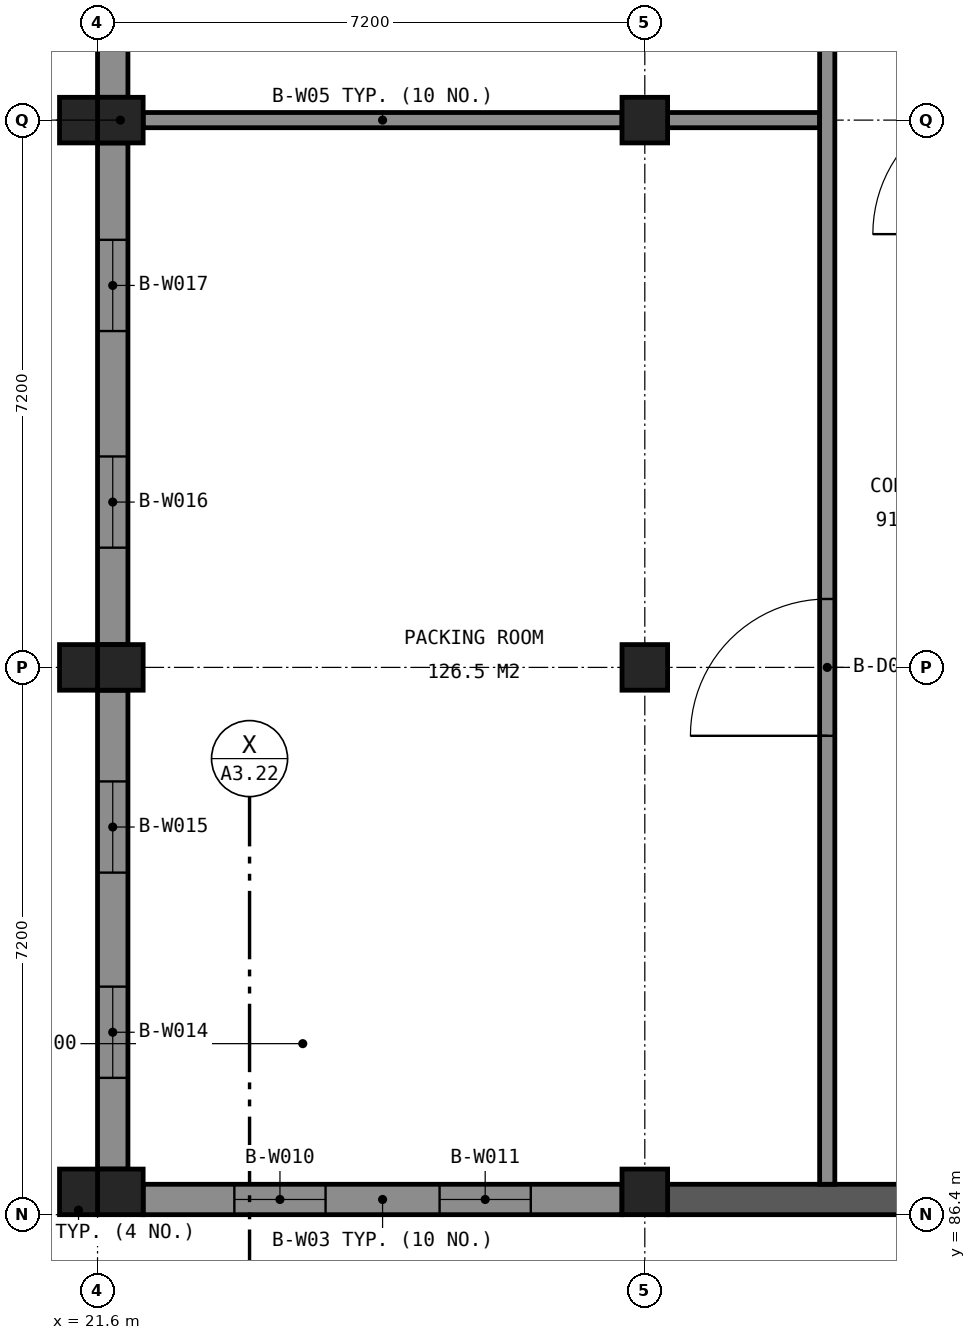
"""IFC4 building model, lengths in metres.
Left out: names, types, materials, properties, quantities, classifications, styles, units other than length and angle.
Written with IfcOpenShell. Run it as: python <this file> out.ifc"""

import sys

from ifc_helpers import new_model, si_unit, direction, frame, frame_2d, origin, origin_2d, place, context, subcontext, project, spatial, rectangle, extrude, element, fill, save


model = new_model("IFC4")
c1 = context("Model", 3, precision=1e-05, world=origin(), true_north=direction((0.0, 1.0)))
c2 = subcontext(c1, "Body", "Model", "MODEL_VIEW")
j1 = project(units=[si_unit("LENGTHUNIT", "METRE"), si_unit("PLANEANGLEUNIT", "RADIAN")], contexts=[c1])
p1 = place(None, origin())
s1 = spatial("IfcSite", under=j1, at=p1, CompositionType="ELEMENT")
p2 = place(p1, origin())
s2 = spatial("IfcBuilding", under=s1, at=p2, CompositionType="ELEMENT")
p3 = place(p2, frame((0.0, 0.0, 4.8)))
s3 = spatial("IfcBuildingStorey", under=s2, at=p3, CompositionType="ELEMENT", Elevation=4.8)
for number, where, z_axis, x_axis in (
    (1, (21.9, 100.8, 0.0), (0.0, 0.0, 1.0), (1.0, 0.0, 0.0)),
    (2, (21.9, 93.6, 0.0), (0.0, 0.0, 1.0), (1.0, 0.0, 0.0)),
    (3, (21.9, 86.7, 0.0), (0.0, 0.0, 1.0), (1.0, 0.0, 0.0)),
    (4, (28.8, 100.8, 0.0), (0.0, 0.0, 1.0), (1.0, 0.0, 0.0)),
    (5, (28.8, 93.6, 0.0), (0.0, 0.0, 1.0), (1.0, 0.0, 0.0)),
    (6, (28.8, 86.7, 0.0), (0.0, 0.0, 1.0), (1.0, 0.0, 0.0)),
):
    element("IfcColumn", number, at=place(p3, frame(where, z_axis=z_axis, x_axis=x_axis)), inside=s3, PredefinedType="COLUMN", context=c2, shape_type="SweptSolid", body=[
        extrude(rectangle(XDim=0.6, YDim=0.6, at=origin_2d()), origin(), (0.0, 0.0, 1.0), 4.8),
    ])
p4 = place(p3, frame((29.1, 86.6, 0.0), z_axis=(0.0, 0.0, 1.0), x_axis=(1.0, 0.0, 0.0)))
e7 = element("IfcWall", 7, at=p4, inside=s3, PredefinedType="SHEAR", context=c2, shape_type="SweptSolid", body=[
    extrude(rectangle(XDim=13.7, YDim=0.4, at=frame_2d((6.85, 0.0))), origin(), (0.0, 0.0, 1.0), 4.55),
])
p5 = place(p3, frame((22.2, 86.6, 0.0), z_axis=(0.0, 0.0, 1.0), x_axis=(1.0, 0.0, 0.0)))
e8 = element("IfcWall", 8, at=p5, inside=s3, PredefinedType="SOLIDWALL", context=c2, shape_type="SweptSolid", body=[
    extrude(rectangle(XDim=6.3, YDim=0.4, at=frame_2d((3.15, 0.0))), origin(), (0.0, 0.0, 1.0), 3.95),
])
p6 = place(p5, frame((1.2, 0.0, 0.9)))
e9 = element("IfcOpeningElement", 9, at=p6, cuts=e8, PredefinedType="OPENING", context=c2, shape_type="SweptSolid", body=[
    extrude(rectangle(XDim=1.2, YDim=2.4, at=frame_2d((0.6, 1.2))), frame((0.0, 0.21, 0.0), z_axis=(0.0, -1.0, 0.0), x_axis=(1.0, 0.0, 0.0)), (0.0, 0.0, 1.0), 0.42),
])
p7 = place(p5, frame((3.9, 0.0, 0.9)))
e10 = element("IfcOpeningElement", 10, at=p7, cuts=e8, PredefinedType="OPENING", context=c2, shape_type="SweptSolid", body=[
    extrude(rectangle(XDim=1.2, YDim=2.4, at=frame_2d((0.6, 1.2))), frame((0.0, 0.21, 0.0), z_axis=(0.0, -1.0, 0.0), x_axis=(1.0, 0.0, 0.0)), (0.0, 0.0, 1.0), 0.42),
])
p8 = place(p3, frame((21.8, 87.0, 0.0), z_axis=(0.0, 0.0, 1.0), x_axis=(0.0, 1.0, 0.0)))
e11 = element("IfcWall", 11, at=p8, inside=s3, PredefinedType="SOLIDWALL", context=c2, shape_type="SweptSolid", body=[
    extrude(rectangle(XDim=6.3, YDim=0.4, at=frame_2d((3.15, 0.0))), origin(), (0.0, 0.0, 1.0), 3.95),
])
p9 = place(p8, frame((1.2, 0.0, 0.9)))
e12 = element("IfcOpeningElement", 12, at=p9, cuts=e11, PredefinedType="OPENING", context=c2, shape_type="SweptSolid", body=[
    extrude(rectangle(XDim=1.2, YDim=2.4, at=frame_2d((0.6, 1.2))), frame((0.0, 0.21, 0.0), z_axis=(0.0, -1.0, 0.0), x_axis=(1.0, 0.0, 0.0)), (0.0, 0.0, 1.0), 0.42),
])
p10 = place(p8, frame((3.9, 0.0, 0.9)))
e13 = element("IfcOpeningElement", 13, at=p10, cuts=e11, PredefinedType="OPENING", context=c2, shape_type="SweptSolid", body=[
    extrude(rectangle(XDim=1.2, YDim=2.4, at=frame_2d((0.6, 1.2))), frame((0.0, 0.21, 0.0), z_axis=(0.0, -1.0, 0.0), x_axis=(1.0, 0.0, 0.0)), (0.0, 0.0, 1.0), 0.42),
])
p11 = place(p3, frame((21.8, 93.9, 0.0), z_axis=(0.0, 0.0, 1.0), x_axis=(0.0, 1.0, 0.0)))
e14 = element("IfcWall", 14, at=p11, inside=s3, PredefinedType="SOLIDWALL", context=c2, shape_type="SweptSolid", body=[
    extrude(rectangle(XDim=6.6, YDim=0.4, at=frame_2d((3.3, 0.0))), origin(), (0.0, 0.0, 1.0), 3.95),
])
p12 = place(p11, frame((1.275, 0.0, 0.9)))
e15 = element("IfcOpeningElement", 15, at=p12, cuts=e14, PredefinedType="OPENING", context=c2, shape_type="SweptSolid", body=[
    extrude(rectangle(XDim=1.2, YDim=2.4, at=frame_2d((0.6, 1.2))), frame((0.0, 0.21, 0.0), z_axis=(0.0, -1.0, 0.0), x_axis=(1.0, 0.0, 0.0)), (0.0, 0.0, 1.0), 0.42),
])
p13 = place(p11, frame((4.125, 0.0, 0.9)))
e16 = element("IfcOpeningElement", 16, at=p13, cuts=e14, PredefinedType="OPENING", context=c2, shape_type="SweptSolid", body=[
    extrude(rectangle(XDim=1.2, YDim=2.4, at=frame_2d((0.6, 1.2))), frame((0.0, 0.21, 0.0), z_axis=(0.0, -1.0, 0.0), x_axis=(1.0, 0.0, 0.0)), (0.0, 0.0, 1.0), 0.42),
])
p14 = place(p3, frame((21.8, 101.1, 0.0), z_axis=(0.0, 0.0, 1.0), x_axis=(0.0, 1.0, 0.0)))
e17 = element("IfcWall", 17, at=p14, inside=s3, PredefinedType="SOLIDWALL", context=c2, shape_type="SweptSolid", body=[
    extrude(rectangle(XDim=6.6, YDim=0.4, at=frame_2d((3.3, 0.0))), origin(), (0.0, 0.0, 1.0), 3.95),
])
p15 = place(p14, frame((1.275, 0.0, 0.9)))
e18 = element("IfcOpeningElement", 18, at=p15, cuts=e17, PredefinedType="OPENING", context=c2, shape_type="SweptSolid", body=[
    extrude(rectangle(XDim=1.2, YDim=2.4, at=frame_2d((0.6, 1.2))), frame((0.0, 0.21, 0.0), z_axis=(0.0, -1.0, 0.0), x_axis=(1.0, 0.0, 0.0)), (0.0, 0.0, 1.0), 0.42),
])
p16 = place(p14, frame((4.125, 0.0, 0.9)))
e19 = element("IfcOpeningElement", 19, at=p16, cuts=e17, PredefinedType="OPENING", context=c2, shape_type="SweptSolid", body=[
    extrude(rectangle(XDim=1.2, YDim=2.4, at=frame_2d((0.6, 1.2))), frame((0.0, 0.21, 0.0), z_axis=(0.0, -1.0, 0.0), x_axis=(1.0, 0.0, 0.0)), (0.0, 0.0, 1.0), 0.42),
])
for number, where, z_axis, x_axis in (
    (20, (21.35, 86.7, 0.0), (0.0, 0.0, 1.0), (1.0, 0.0, 0.0)),
    (21, (21.35, 93.6, 0.0), (0.0, 0.0, 1.0), (1.0, 0.0, 0.0)),
    (22, (21.35, 100.8, 0.0), (0.0, 0.0, 1.0), (1.0, 0.0, 0.0)),
):
    element("IfcColumn", number, at=place(p3, frame(where, z_axis=z_axis, x_axis=x_axis)), inside=s3, PredefinedType="COLUMN", context=c2, shape_type="SweptSolid", body=[
        extrude(rectangle(XDim=0.5, YDim=0.6, at=origin_2d()), origin(), (0.0, 0.0, 1.0), 4.8),
    ])
p17 = place(p3, frame((22.2, 100.8, 0.0), z_axis=(0.0, 0.0, 1.0), x_axis=(1.0, 0.0, 0.0)))
e23 = element("IfcWall", 23, at=p17, inside=s3, PredefinedType="PARTITIONING", context=c2, shape_type="SweptSolid", body=[
    extrude(rectangle(XDim=6.3, YDim=0.2, at=frame_2d((3.15, 0.0))), origin(), (0.0, 0.0, 1.0), 3.95),
])
p18 = place(p3, frame((29.1, 100.8, 0.0), z_axis=(0.0, 0.0, 1.0), x_axis=(1.0, 0.0, 0.0)))
e24 = element("IfcWall", 24, at=p18, inside=s3, PredefinedType="PARTITIONING", context=c2, shape_type="SweptSolid", body=[
    extrude(rectangle(XDim=2.0, YDim=0.2, at=frame_2d((1.0, 0.0))), origin(), (0.0, 0.0, 1.0), 3.95),
])
p19 = place(p3, frame((31.2, 86.8, 0.0), z_axis=(0.0, 0.0, 1.0), x_axis=(0.0, 1.0, 0.0)))
e25 = element("IfcWall", 25, at=p19, inside=s3, PredefinedType="PARTITIONING", context=c2, shape_type="SweptSolid", body=[
    extrude(rectangle(XDim=42.4, YDim=0.2, at=frame_2d((21.2, 0.0))), origin(), (0.0, 0.0, 1.0), 3.95),
])
p20 = place(p19, frame((34.7, 0.0, 0.0)))
e26 = element("IfcOpeningElement", 26, at=p20, cuts=e25, PredefinedType="OPENING", context=c2, shape_type="SweptSolid", body=[
    extrude(rectangle(XDim=1.8, YDim=2.1, at=frame_2d((0.9, 1.05))), frame((0.0, 0.11, 0.0), z_axis=(0.0, -1.0, 0.0), x_axis=(1.0, 0.0, 0.0)), (0.0, 0.0, 1.0), 0.22),
])
p21 = place(p19, frame((20.3, 0.0, 0.0)))
e27 = element("IfcOpeningElement", 27, at=p21, cuts=e25, PredefinedType="OPENING", context=c2, shape_type="SweptSolid", body=[
    extrude(rectangle(XDim=1.8, YDim=2.1, at=frame_2d((0.9, 1.05))), frame((0.0, 0.11, 0.0), z_axis=(0.0, -1.0, 0.0), x_axis=(1.0, 0.0, 0.0)), (0.0, 0.0, 1.0), 0.22),
])
p22 = place(p19, frame((5.9, 0.0, 0.0)))
e28 = element("IfcOpeningElement", 28, at=p22, cuts=e25, PredefinedType="OPENING", context=c2, shape_type="SweptSolid", body=[
    extrude(rectangle(XDim=1.8, YDim=2.1, at=frame_2d((0.9, 1.05))), frame((0.0, 0.11, 0.0), z_axis=(0.0, -1.0, 0.0), x_axis=(1.0, 0.0, 0.0)), (0.0, 0.0, 1.0), 0.22),
])
p23 = place(p6, origin())
e29 = element("IfcWindow", 29, at=p23, inside=s3, PartitioningType="SINGLE_PANEL", PredefinedType="WINDOW", context=c2, shape_type="SweptSolid", body=[
    extrude(rectangle(XDim=1.2, YDim=2.4, at=frame_2d((0.6, 1.2))), frame((0.0, 0.03, 0.0), z_axis=(0.0, -1.0, 0.0), x_axis=(1.0, 0.0, 0.0)), (0.0, 0.0, 1.0), 0.06),
])
fill(e9, e29)
p24 = place(p7, origin())
e30 = element("IfcWindow", 30, at=p24, inside=s3, PartitioningType="SINGLE_PANEL", PredefinedType="WINDOW", context=c2, shape_type="SweptSolid", body=[
    extrude(rectangle(XDim=1.2, YDim=2.4, at=frame_2d((0.6, 1.2))), frame((0.0, 0.03, 0.0), z_axis=(0.0, -1.0, 0.0), x_axis=(1.0, 0.0, 0.0)), (0.0, 0.0, 1.0), 0.06),
])
fill(e10, e30)
p25 = place(p9, origin())
e31 = element("IfcWindow", 31, at=p25, inside=s3, PartitioningType="SINGLE_PANEL", PredefinedType="WINDOW", context=c2, shape_type="SweptSolid", body=[
    extrude(rectangle(XDim=1.2, YDim=2.4, at=frame_2d((0.6, 1.2))), frame((0.0, 0.03, 0.0), z_axis=(0.0, -1.0, 0.0), x_axis=(1.0, 0.0, 0.0)), (0.0, 0.0, 1.0), 0.06),
])
fill(e12, e31)
p26 = place(p10, origin())
e32 = element("IfcWindow", 32, at=p26, inside=s3, PartitioningType="SINGLE_PANEL", PredefinedType="WINDOW", context=c2, shape_type="SweptSolid", body=[
    extrude(rectangle(XDim=1.2, YDim=2.4, at=frame_2d((0.6, 1.2))), frame((0.0, 0.03, 0.0), z_axis=(0.0, -1.0, 0.0), x_axis=(1.0, 0.0, 0.0)), (0.0, 0.0, 1.0), 0.06),
])
fill(e13, e32)
p27 = place(p12, origin())
e33 = element("IfcWindow", 33, at=p27, inside=s3, PartitioningType="SINGLE_PANEL", PredefinedType="WINDOW", context=c2, shape_type="SweptSolid", body=[
    extrude(rectangle(XDim=1.2, YDim=2.4, at=frame_2d((0.6, 1.2))), frame((0.0, 0.03, 0.0), z_axis=(0.0, -1.0, 0.0), x_axis=(1.0, 0.0, 0.0)), (0.0, 0.0, 1.0), 0.06),
])
fill(e15, e33)
p28 = place(p13, origin())
e34 = element("IfcWindow", 34, at=p28, inside=s3, PartitioningType="SINGLE_PANEL", PredefinedType="WINDOW", context=c2, shape_type="SweptSolid", body=[
    extrude(rectangle(XDim=1.2, YDim=2.4, at=frame_2d((0.6, 1.2))), frame((0.0, 0.03, 0.0), z_axis=(0.0, -1.0, 0.0), x_axis=(1.0, 0.0, 0.0)), (0.0, 0.0, 1.0), 0.06),
])
fill(e16, e34)
p29 = place(p22, origin())
e35 = element("IfcDoor", 35, at=p29, inside=s3, OperationType="DOUBLE_DOOR_DOUBLE_SWING", PredefinedType="DOOR", context=c2, shape_type="SweptSolid", body=[
    extrude(rectangle(XDim=1.8, YDim=2.1, at=frame_2d((0.9, 1.05))), frame((0.0, 0.025, 0.0), z_axis=(0.0, -1.0, 0.0), x_axis=(1.0, 0.0, 0.0)), (0.0, 0.0, 1.0), 0.05),
])
fill(e28, e35)
save(model, sys.argv[1])
